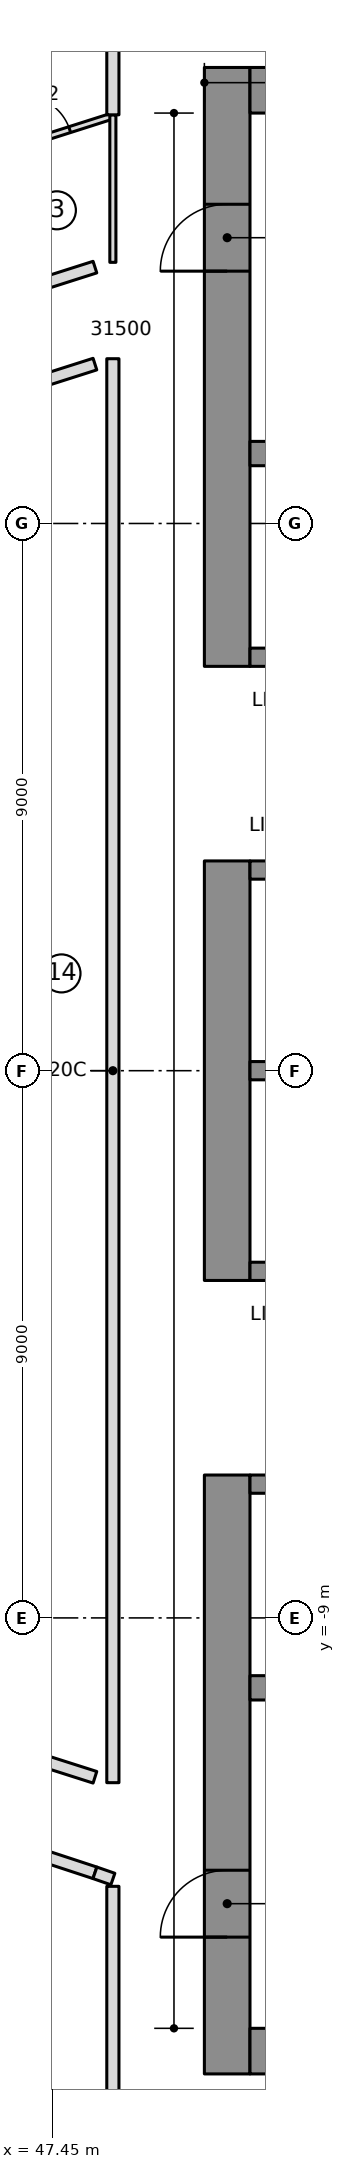
"""IFC4 building model, lengths in metres.
Left out: names, types, materials, properties, quantities, classifications, styles, units other than length and angle.
Written with IfcOpenShell. Run it as: python <this file> out.ifc"""

import sys

from ifc_helpers import new_model, si_unit, direction, frame, frame_2d, origin, place, context, subcontext, project, spatial, rectangle, extrude, element, fill, save


model = new_model("IFC4")
c1 = context("Model", 3, precision=1e-05, world=origin(), true_north=direction((0.0, 1.0)))
c2 = subcontext(c1, "Body", "Model", "MODEL_VIEW")
j1 = project(units=[si_unit("LENGTHUNIT", "METRE"), si_unit("PLANEANGLEUNIT", "RADIAN")], contexts=[c1])
p1 = place(None, origin())
s1 = spatial("IfcSite", under=j1, at=p1, CompositionType="ELEMENT")
p2 = place(p1, origin())
s2 = spatial("IfcBuilding", under=s1, at=p2, CompositionType="ELEMENT")
p3 = place(p2, frame((0.0, 0.0, 179.05)))
s3 = spatial("IfcBuildingStorey", under=s2, at=p3, CompositionType="ELEMENT", Elevation=179.05)
p4 = place(p3, frame((50.325, 6.65, 0.0), z_axis=(0.0, 0.0, 1.0), x_axis=(0.0, 1.0, 0.0)))
e1 = element("IfcWall", 1, at=p4, inside=s3, PredefinedType="SHEAR", context=c2, shape_type="SweptSolid", body=[
    extrude(rectangle(XDim=9.85, YDim=0.75, at=frame_2d((4.925, 0.0))), origin(), (0.0, 0.0, 1.0), 3.55),
])
p5 = place(p4, frame((6.5, 0.0, 0.0)))
e2 = element("IfcOpeningElement", 2, at=p5, cuts=e1, PredefinedType="OPENING", context=c2, shape_type="SweptSolid", body=[
    extrude(rectangle(XDim=1.1, YDim=2.1, at=frame_2d((0.55, 1.05))), frame((0.0, 0.385, 0.0), z_axis=(0.0, -1.0, 0.0), x_axis=(1.0, 0.0, 0.0)), (0.0, 0.0, 1.0), 0.77),
])
p6 = place(p3, frame((50.325, -3.45, 0.0), z_axis=(0.0, 0.0, 1.0), x_axis=(0.0, 1.0, 0.0)))
e3 = element("IfcWall", 3, at=p6, inside=s3, PredefinedType="SHEAR", context=c2, shape_type="SweptSolid", body=[
    extrude(rectangle(XDim=6.9, YDim=0.75, at=frame_2d((3.45, 0.0))), origin(), (0.0, 0.0, 1.0), 3.55),
])
p7 = place(p3, frame((50.325, -16.5, 0.0), z_axis=(0.0, 0.0, 1.0), x_axis=(0.0, 1.0, 0.0)))
e4 = element("IfcWall", 4, at=p7, inside=s3, PredefinedType="SHEAR", context=c2, shape_type="SweptSolid", body=[
    extrude(rectangle(XDim=9.85, YDim=0.75, at=frame_2d((4.925, 0.0))), origin(), (0.0, 0.0, 1.0), 3.55),
])
p8 = place(p7, frame((2.25, 0.0, 0.0)))
e5 = element("IfcOpeningElement", 5, at=p8, cuts=e4, PredefinedType="OPENING", context=c2, shape_type="SweptSolid", body=[
    extrude(rectangle(XDim=1.1, YDim=2.1, at=frame_2d((0.55, 1.05))), frame((0.0, 0.385, 0.0), z_axis=(0.0, -1.0, 0.0), x_axis=(1.0, 0.0, 0.0)), (0.0, 0.0, 1.0), 0.77),
])
for number, where, z_axis, x_axis in (
    (6, (50.7, 16.125, 0.0), (0.0, 0.0, 1.0), (1.0, 0.0, 0.0)),
    (7, (50.7, -16.125, 0.0), (0.0, 0.0, 1.0), (1.0, 0.0, 0.0)),
):
    element("IfcWall", number, at=place(p3, frame(where, z_axis=z_axis, x_axis=x_axis)), inside=s3, PredefinedType="SHEAR", context=c2, shape_type="SweptSolid", body=[
        extrude(rectangle(XDim=13.77, YDim=0.75, at=frame_2d((6.885, 0.0))), origin(), (0.0, 0.0, 1.0), 3.55),
    ])
p9 = place(p3, frame((50.7, 10.15, 0.0), z_axis=(0.0, 0.0, 1.0), x_axis=(1.0, 0.0, 0.0)))
e8 = element("IfcWall", 8, at=p9, inside=s3, PredefinedType="SHEAR", context=c2, shape_type="SweptSolid", body=[
    extrude(rectangle(XDim=13.02, YDim=0.4, at=frame_2d((6.51, 0.0))), origin(), (0.0, 0.0, 1.0), 3.55),
])
p10 = place(p9, frame((0.7, 0.0, 0.0)))
e9 = element("IfcOpeningElement", 9, at=p10, cuts=e8, PredefinedType="OPENING", context=c2, shape_type="SweptSolid", body=[
    extrude(rectangle(XDim=1.1, YDim=2.1, at=frame_2d((0.55, 1.05))), frame((0.0, 0.21, 0.0), z_axis=(0.0, -1.0, 0.0), x_axis=(1.0, 0.0, 0.0)), (0.0, 0.0, 1.0), 0.42),
])
p11 = place(p9, frame((3.5, 0.0, 0.0)))
e10 = element("IfcOpeningElement", 10, at=p11, cuts=e8, PredefinedType="OPENING", context=c2, shape_type="SweptSolid", body=[
    extrude(rectangle(XDim=1.1, YDim=2.1, at=frame_2d((0.55, 1.05))), frame((0.0, 0.21, 0.0), z_axis=(0.0, -1.0, 0.0), x_axis=(1.0, 0.0, 0.0)), (0.0, 0.0, 1.0), 0.42),
])
p12 = place(p3, frame((50.7, -10.15, 0.0), z_axis=(0.0, 0.0, 1.0), x_axis=(1.0, 0.0, 0.0)))
e11 = element("IfcWall", 11, at=p12, inside=s3, PredefinedType="SHEAR", context=c2, shape_type="SweptSolid", body=[
    extrude(rectangle(XDim=13.02, YDim=0.4, at=frame_2d((6.51, 0.0))), origin(), (0.0, 0.0, 1.0), 3.55),
])
p13 = place(p3, frame((50.7, 0.0, 0.0), z_axis=(0.0, 0.0, 1.0), x_axis=(1.0, 0.0, 0.0)))
e12 = element("IfcWall", 12, at=p13, inside=s3, PredefinedType="SHEAR", context=c2, shape_type="SweptSolid", body=[
    extrude(rectangle(XDim=10.9, YDim=0.3, at=frame_2d((5.45, 0.0))), origin(), (0.0, 0.0, 1.0), 3.55),
])
p14 = place(p3, frame((50.7, 3.3, 0.0), z_axis=(0.0, 0.0, 1.0), x_axis=(1.0, 0.0, 0.0)))
e13 = element("IfcWall", 13, at=p14, inside=s3, PredefinedType="SHEAR", context=c2, shape_type="SweptSolid", body=[
    extrude(rectangle(XDim=10.9, YDim=0.3, at=frame_2d((5.45, 0.0))), origin(), (0.0, 0.0, 1.0), 3.55),
])
p15 = place(p14, frame((0.7, 0.0, 0.0)))
e14 = element("IfcOpeningElement", 14, at=p15, cuts=e13, PredefinedType="OPENING", context=c2, shape_type="SweptSolid", body=[
    extrude(rectangle(XDim=1.1, YDim=2.1, at=frame_2d((0.55, 1.05))), frame((0.0, 0.16, 0.0), z_axis=(0.0, -1.0, 0.0), x_axis=(1.0, 0.0, 0.0)), (0.0, 0.0, 1.0), 0.32),
])
p16 = place(p14, frame((3.5, 0.0, 0.0)))
e15 = element("IfcOpeningElement", 15, at=p16, cuts=e13, PredefinedType="OPENING", context=c2, shape_type="SweptSolid", body=[
    extrude(rectangle(XDim=1.1, YDim=2.1, at=frame_2d((0.55, 1.05))), frame((0.0, 0.16, 0.0), z_axis=(0.0, -1.0, 0.0), x_axis=(1.0, 0.0, 0.0)), (0.0, 0.0, 1.0), 0.32),
])
p17 = place(p14, frame((6.3, 0.0, 0.0)))
e16 = element("IfcOpeningElement", 16, at=p17, cuts=e13, PredefinedType="OPENING", context=c2, shape_type="SweptSolid", body=[
    extrude(rectangle(XDim=1.1, YDim=2.1, at=frame_2d((0.55, 1.05))), frame((0.0, 0.16, 0.0), z_axis=(0.0, -1.0, 0.0), x_axis=(1.0, 0.0, 0.0)), (0.0, 0.0, 1.0), 0.32),
])
p18 = place(p14, frame((9.1, 0.0, 0.0)))
e17 = element("IfcOpeningElement", 17, at=p18, cuts=e13, PredefinedType="OPENING", context=c2, shape_type="SweptSolid", body=[
    extrude(rectangle(XDim=1.1, YDim=2.1, at=frame_2d((0.55, 1.05))), frame((0.0, 0.16, 0.0), z_axis=(0.0, -1.0, 0.0), x_axis=(1.0, 0.0, 0.0)), (0.0, 0.0, 1.0), 0.32),
])
p19 = place(p3, frame((50.7, 6.8, 0.0), z_axis=(0.0, 0.0, 1.0), x_axis=(1.0, 0.0, 0.0)))
e18 = element("IfcWall", 18, at=p19, inside=s3, PredefinedType="SHEAR", context=c2, shape_type="SweptSolid", body=[
    extrude(rectangle(XDim=10.9, YDim=0.3, at=frame_2d((5.45, 0.0))), origin(), (0.0, 0.0, 1.0), 3.55),
])
p20 = place(p19, frame((6.4, 0.0, 0.0)))
e19 = element("IfcOpeningElement", 19, at=p20, cuts=e18, PredefinedType="OPENING", context=c2, shape_type="SweptSolid", body=[
    extrude(rectangle(XDim=0.9, YDim=2.1, at=frame_2d((0.45, 1.05))), frame((0.0, 0.16, 0.0), z_axis=(0.0, -1.0, 0.0), x_axis=(1.0, 0.0, 0.0)), (0.0, 0.0, 1.0), 0.32),
])
p21 = place(p19, frame((9.2, 0.0, 0.0)))
e20 = element("IfcOpeningElement", 20, at=p21, cuts=e18, PredefinedType="OPENING", context=c2, shape_type="SweptSolid", body=[
    extrude(rectangle(XDim=0.9, YDim=2.1, at=frame_2d((0.45, 1.05))), frame((0.0, 0.16, 0.0), z_axis=(0.0, -1.0, 0.0), x_axis=(1.0, 0.0, 0.0)), (0.0, 0.0, 1.0), 0.32),
])
p22 = place(p3, frame((50.7, -3.3, 0.0), z_axis=(0.0, 0.0, 1.0), x_axis=(1.0, 0.0, 0.0)))
e21 = element("IfcWall", 21, at=p22, inside=s3, PredefinedType="SHEAR", context=c2, shape_type="SweptSolid", body=[
    extrude(rectangle(XDim=10.9, YDim=0.3, at=frame_2d((5.45, 0.0))), origin(), (0.0, 0.0, 1.0), 3.55),
])
p23 = place(p22, frame((9.1, 0.0, 0.0)))
e22 = element("IfcOpeningElement", 22, at=p23, cuts=e21, PredefinedType="OPENING", context=c2, shape_type="SweptSolid", body=[
    extrude(rectangle(XDim=1.1, YDim=2.1, at=frame_2d((0.55, 1.05))), frame((0.0, 0.16, 0.0), z_axis=(0.0, -1.0, 0.0), x_axis=(1.0, 0.0, 0.0)), (0.0, 0.0, 1.0), 0.32),
])
p24 = place(p3, frame((50.7, -6.8, 0.0), z_axis=(0.0, 0.0, 1.0), x_axis=(1.0, 0.0, 0.0)))
e23 = element("IfcWall", 23, at=p24, inside=s3, PredefinedType="SHEAR", context=c2, shape_type="SweptSolid", body=[
    extrude(rectangle(XDim=10.9, YDim=0.3, at=frame_2d((5.45, 0.0))), origin(), (0.0, 0.0, 1.0), 3.55),
])
p25 = place(p24, frame((6.3, 0.0, 0.0)))
e24 = element("IfcOpeningElement", 24, at=p25, cuts=e23, PredefinedType="OPENING", context=c2, shape_type="SweptSolid", body=[
    extrude(rectangle(XDim=1.1, YDim=2.1, at=frame_2d((0.55, 1.05))), frame((0.0, 0.16, 0.0), z_axis=(0.0, -1.0, 0.0), x_axis=(1.0, 0.0, 0.0)), (0.0, 0.0, 1.0), 0.32),
])
p26 = place(p24, frame((9.1, 0.0, 0.0)))
e25 = element("IfcOpeningElement", 25, at=p26, cuts=e23, PredefinedType="OPENING", context=c2, shape_type="SweptSolid", body=[
    extrude(rectangle(XDim=1.1, YDim=2.1, at=frame_2d((0.55, 1.05))), frame((0.0, 0.16, 0.0), z_axis=(0.0, -1.0, 0.0), x_axis=(1.0, 0.0, 0.0)), (0.0, 0.0, 1.0), 0.32),
])
p27 = place(p24, frame((0.8, 0.0, 0.0)))
e26 = element("IfcOpeningElement", 26, at=p27, cuts=e23, PredefinedType="OPENING", context=c2, shape_type="SweptSolid", body=[
    extrude(rectangle(XDim=0.9, YDim=2.1, at=frame_2d((0.45, 1.05))), frame((0.0, 0.16, 0.0), z_axis=(0.0, -1.0, 0.0), x_axis=(1.0, 0.0, 0.0)), (0.0, 0.0, 1.0), 0.32),
])
p28 = place(p24, frame((3.6, 0.0, 0.0)))
e27 = element("IfcOpeningElement", 27, at=p28, cuts=e23, PredefinedType="OPENING", context=c2, shape_type="SweptSolid", body=[
    extrude(rectangle(XDim=0.9, YDim=2.1, at=frame_2d((0.45, 1.05))), frame((0.0, 0.16, 0.0), z_axis=(0.0, -1.0, 0.0), x_axis=(1.0, 0.0, 0.0)), (0.0, 0.0, 1.0), 0.32),
])
p29 = place(p3, frame((46.259, 15.007, 0.0), z_axis=(0.0, 0.0, 1.0), x_axis=(0.952731222045, 0.303814447552, 0.0)))
e28 = element("IfcWall", 28, at=p29, inside=s3, PredefinedType="PARTITIONING", context=c2, shape_type="SweptSolid", body=[
    extrude(rectangle(XDim=2.277, YDim=0.1, at=frame_2d((1.138, 0.0))), origin(), (0.0, 0.0, 1.0), 3.25),
])
p30 = place(p29, frame((0.75, 0.0, 0.0)))
e29 = element("IfcOpeningElement", 29, at=p30, cuts=e28, PredefinedType="OPENING", context=c2, shape_type="SweptSolid", body=[
    extrude(rectangle(XDim=0.8, YDim=2.1, at=frame_2d((0.4, 1.05))), frame((0.0, 0.06, 0.0), z_axis=(0.0, -1.0, 0.0), x_axis=(1.0, 0.0, 0.0)), (0.0, 0.0, 1.0), 0.12),
])
p31 = place(p3, frame((48.445, 15.721, 0.0), z_axis=(0.0, 0.0, 1.0), x_axis=(0.0, -1.0, 0.0)))
e30 = element("IfcWall", 30, at=p31, inside=s3, PredefinedType="PARTITIONING", context=c2, shape_type="SweptSolid", body=[
    extrude(rectangle(XDim=2.426, YDim=0.1, at=frame_2d((1.213, 0.0))), origin(), (0.0, 0.0, 1.0), 3.25),
])
p32 = place(p3, frame((48.15, 13.217, 0.0), z_axis=(0.0, 0.0, 1.0), x_axis=(-0.952731090451, -0.303814860215, 0.0)))
e31 = element("IfcWall", 31, at=p32, inside=s3, PredefinedType="PARTITIONING", context=c2, shape_type="SweptSolid", body=[
    extrude(rectangle(XDim=1.088, YDim=0.2, at=frame_2d((0.544, 0.0))), origin(), (0.0, 0.0, 1.0), 3.25),
])
p33 = place(p3, frame((43.026, -11.507, 0.0), z_axis=(0.0, 0.0, 1.0), x_axis=(0.949951949432, -0.312396052744, 0.0)))
e32 = element("IfcWall", 32, at=p33, inside=s3, PredefinedType="PARTITIONING", context=c2, shape_type="SweptSolid", body=[
    extrude(rectangle(XDim=5.394, YDim=0.2, at=frame_2d((2.697, 0.0))), origin(), (0.0, 0.0, 1.0), 3.25),
])
p34 = place(p33, frame((3.05, 0.0, 0.0)))
e33 = element("IfcOpeningElement", 33, at=p34, cuts=e32, PredefinedType="OPENING", context=c2, shape_type="SweptSolid", body=[
    extrude(rectangle(XDim=1.0, YDim=2.1, at=frame_2d((0.5, 1.05))), frame((0.0, 0.11, 0.0), z_axis=(0.0, -1.0, 0.0), x_axis=(1.0, 0.0, 0.0)), (0.0, 0.0, 1.0), 0.22),
])
for number, where, z_axis, x_axis in (
    (34, (46.881, 11.217, 0.0), (0.0, 0.0, 1.0), (0.953, 0.304, 0.0)),
    (35, (48.15, -11.621, 0.0), (0.0, 0.0, 1.0), (-0.953, 0.304, 0.0)),
):
    element("IfcWall", number, at=place(p3, frame(where, z_axis=z_axis, x_axis=x_axis)), inside=s3, PredefinedType="PARTITIONING", context=c2, shape_type="SweptSolid", body=[
        extrude(rectangle(XDim=1.332, YDim=0.2, at=frame_2d((0.666, 0.0))), origin(), (0.0, 0.0, 1.0), 3.25),
    ])
p35 = place(p3, frame((48.445, 20.352, 0.0), z_axis=(0.0, 0.0, 1.0), x_axis=(-5.2725931e-05, -0.99999999861, 0.0)))
e36 = element("IfcWall", 36, at=p35, inside=s3, PredefinedType="PARTITIONING", context=c2, shape_type="SweptSolid", body=[
    extrude(rectangle(XDim=4.63, YDim=0.2, at=frame_2d((2.315, 0.0))), origin(), (0.0, 0.0, 1.0), 3.25),
])
p36 = place(p35, frame((1.815, 0.0, 0.0)))
e37 = element("IfcOpeningElement", 37, at=p36, cuts=e36, PredefinedType="OPENING", context=c2, shape_type="SweptSolid", body=[
    extrude(rectangle(XDim=1.0, YDim=2.1, at=frame_2d((0.5, 1.05))), frame((0.0, 0.11, 0.0), z_axis=(0.0, -1.0, 0.0), x_axis=(1.0, 0.0, 0.0)), (0.0, 0.0, 1.0), 0.22),
])
p37 = place(p3, frame((48.445, 11.71, 0.0), z_axis=(0.0, 0.0, 1.0), x_axis=(0.0, -1.0, 0.0)))
e38 = element("IfcWall", 38, at=p37, inside=s3, PredefinedType="PARTITIONING", context=c2, shape_type="SweptSolid", body=[
    extrude(rectangle(XDim=23.42, YDim=0.2, at=frame_2d((11.71, 0.0))), origin(), (0.0, 0.0, 1.0), 3.25),
])
p38 = place(p3, frame((48.15, -13.192, 0.0), z_axis=(0.0, 0.0, 1.0), x_axis=(0.944623214561, -0.328156947987, 0.0)))
e39 = element("IfcWall", 39, at=p38, inside=s3, PredefinedType="PARTITIONING", context=c2, shape_type="SweptSolid", body=[
    extrude(rectangle(XDim=0.312, YDim=0.2, at=frame_2d((0.156, 0.0))), origin(), (0.0, 0.0, 1.0), 3.25),
])
p39 = place(p3, frame((48.445, -13.415, 0.0), z_axis=(0.0, 0.0, 1.0), x_axis=(3.5195157e-05, -0.999999999381, 0.0)))
e40 = element("IfcWall", 40, at=p39, inside=s3, PredefinedType="PARTITIONING", context=c2, shape_type="SweptSolid", body=[
    extrude(rectangle(XDim=6.937, YDim=0.2, at=frame_2d((3.468, 0.0))), origin(), (0.0, 0.0, 1.0), 3.25),
])
p40 = place(p30, origin())
e41 = element("IfcDoor", 41, at=p40, inside=s3, OperationType="SINGLE_SWING_LEFT", PredefinedType="DOOR", context=c2, shape_type="SweptSolid", body=[
    extrude(rectangle(XDim=0.8, YDim=2.1, at=frame_2d((0.4, 1.05))), frame((0.0, 0.025, 0.0), z_axis=(0.0, -1.0, 0.0), x_axis=(1.0, 0.0, 0.0)), (0.0, 0.0, 1.0), 0.05),
])
fill(e29, e41)
p41 = place(p5, origin())
e42 = element("IfcDoor", 42, at=p41, inside=s3, OperationType="SINGLE_SWING_RIGHT", PredefinedType="DOOR", context=c2, shape_type="SweptSolid", body=[
    extrude(rectangle(XDim=1.1, YDim=2.1, at=frame_2d((0.55, 1.05))), frame((0.0, 0.025, 0.0), z_axis=(0.0, -1.0, 0.0), x_axis=(1.0, 0.0, 0.0)), (0.0, 0.0, 1.0), 0.05),
])
fill(e2, e42)
p42 = place(p8, origin())
e43 = element("IfcDoor", 43, at=p42, inside=s3, OperationType="SINGLE_SWING_RIGHT", PredefinedType="DOOR", context=c2, shape_type="SweptSolid", body=[
    extrude(rectangle(XDim=1.1, YDim=2.1, at=frame_2d((0.55, 1.05))), frame((0.0, 0.025, 0.0), z_axis=(0.0, -1.0, 0.0), x_axis=(1.0, 0.0, 0.0)), (0.0, 0.0, 1.0), 0.05),
])
fill(e5, e43)
save(model, sys.argv[1])
